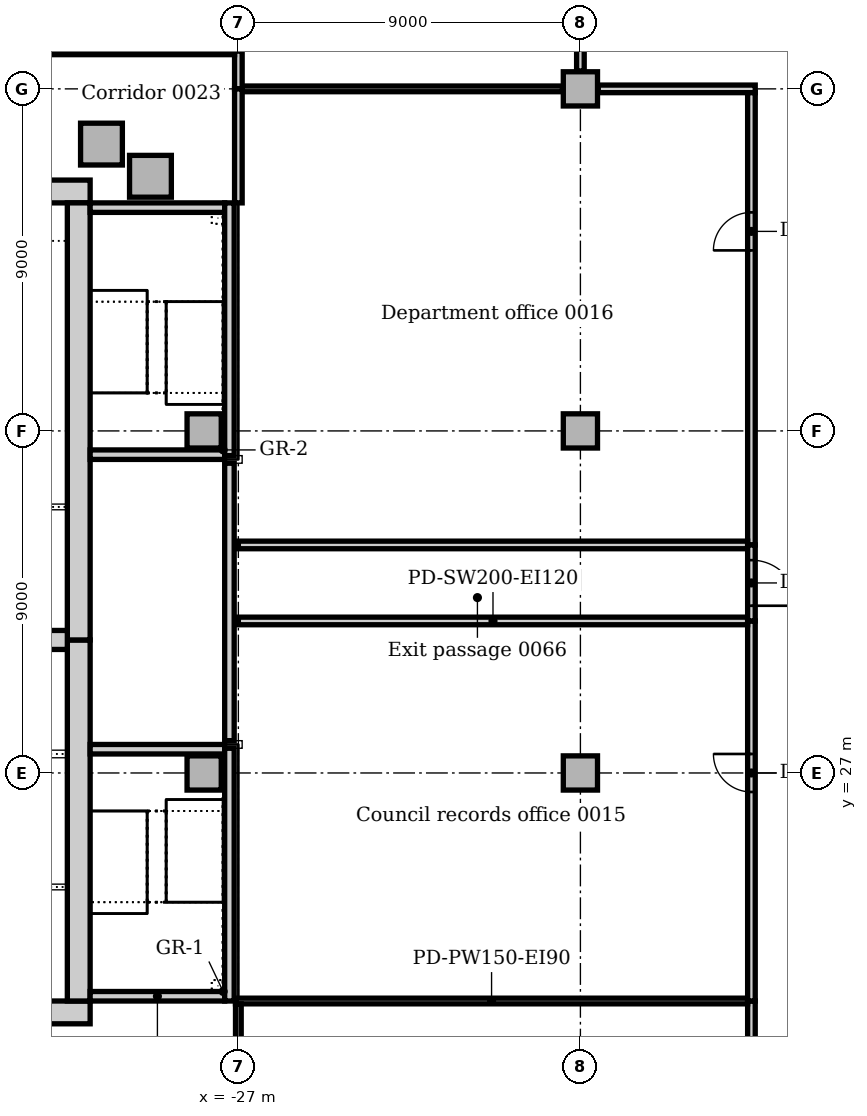
"""IFC4 building model, lengths in metres.
Left out: names, types, materials, properties, quantities, classifications, styles, units other than length and angle.
Written with IfcOpenShell. Run it as: python <this file> out.ifc"""

import sys

from ifc_helpers import new_model, si_unit, direction, frame, frame_2d, origin, origin_2d, place, context, subcontext, project, spatial, rectangle, extrude, element, fill, save


model = new_model("IFC4")
c1 = context("Model", 3, precision=1e-05, world=origin(), true_north=direction((0.0, 1.0)))
c2 = subcontext(c1, "Body", "Model", "MODEL_VIEW")
j1 = project(units=[si_unit("LENGTHUNIT", "METRE"), si_unit("PLANEANGLEUNIT", "RADIAN")], contexts=[c1])
p1 = place(None, origin())
s1 = spatial("IfcSite", under=j1, at=p1, CompositionType="ELEMENT")
p2 = place(p1, origin())
s2 = spatial("IfcBuilding", under=s1, at=p2, CompositionType="ELEMENT")
p3 = place(p2, origin())
s3 = spatial("IfcBuildingStorey", under=s2, at=p3, CompositionType="ELEMENT", Elevation=0.0)
for number, where, z_axis, x_axis in (
    (1, (-42.6, 20.7, 0.0), (0.0, 0.0, 1.0), (1.0, 0.0, 0.0)),
    (2, (-30.9, 42.3, 0.0), (0.0, 0.0, 1.0), (-1.0, 0.0, 0.0)),
):
    element("IfcWall", number, at=place(p3, frame(where, z_axis=z_axis, x_axis=x_axis)), inside=s3, PredefinedType="SOLIDWALL", context=c2, shape_type="SweptSolid", body=[
        extrude(rectangle(XDim=11.7, YDim=0.6, at=frame_2d((5.85, 0.0))), origin(), (0.0, 0.0, 1.0), 6.0),
    ])
p4 = place(p3, frame((-31.2, 21.0, 0.0), z_axis=(0.0, 0.0, 1.0), x_axis=(0.0, 1.0, 0.0)))
e3 = element("IfcWall", 3, at=p4, inside=s3, PredefinedType="SOLIDWALL", context=c2, shape_type="SweptSolid", body=[
    extrude(rectangle(XDim=9.5, YDim=0.6, at=frame_2d((4.75, 0.0))), origin(), (0.0, 0.0, 1.0), 6.0),
])
p5 = place(p4, frame((5.25, 0.0, 0.0)))
e4 = element("IfcOpeningElement", 4, at=p5, cuts=e3, PredefinedType="OPENING", context=c2, shape_type="SweptSolid", body=[
    extrude(rectangle(XDim=1.0, YDim=2.1, at=frame_2d((0.5, 1.05))), frame((0.0, 0.31, 0.0), z_axis=(0.0, -1.0, 0.0), x_axis=(1.0, 0.0, 0.0)), (0.0, 0.0, 1.0), 0.62),
])
p6 = place(p3, frame((-31.2, 30.5, 0.0), z_axis=(0.0, 0.0, 1.0), x_axis=(0.0, 1.0, 0.0)))
e5 = element("IfcWall", 5, at=p6, inside=s3, PredefinedType="SOLIDWALL", context=c2, shape_type="SweptSolid", body=[
    extrude(rectangle(XDim=11.5, YDim=0.6, at=frame_2d((5.75, 0.0))), origin(), (0.0, 0.0, 1.0), 6.0),
])
p7 = place(p6, frame((0.85, 0.0, 0.0)))
e6 = element("IfcOpeningElement", 6, at=p7, cuts=e5, PredefinedType="OPENING", context=c2, shape_type="SweptSolid", body=[
    extrude(rectangle(XDim=1.8, YDim=2.1, at=frame_2d((0.9, 1.05))), frame((0.0, 0.31, 0.0), z_axis=(0.0, -1.0, 0.0), x_axis=(1.0, 0.0, 0.0)), (0.0, 0.0, 1.0), 0.62),
])
p8 = place(p3, frame((-42.0, 30.5, 0.0), z_axis=(0.0, 0.0, 1.0), x_axis=(1.0, 0.0, 0.0)))
e7 = element("IfcWall", 7, at=p8, inside=s3, PredefinedType="SOLIDWALL", context=c2, shape_type="SweptSolid", body=[
    extrude(rectangle(XDim=10.5, YDim=0.5, at=frame_2d((5.25, 0.0))), origin(), (0.0, 0.0, 1.0), 6.0),
])
p9 = place(p3, frame((-30.9, 21.125, 0.0), z_axis=(0.0, 0.0, 1.0), x_axis=(1.0, 0.0, 0.0)))
e8 = element("IfcWall", 8, at=p9, inside=s3, PredefinedType="SOLIDWALL", context=c2, shape_type="SweptSolid", body=[
    extrude(rectangle(XDim=3.54, YDim=0.25, at=frame_2d((1.77, 0.0))), origin(), (0.0, 0.0, 1.0), 6.0),
])
p10 = place(p3, frame((-27.36, 27.625, 0.0), z_axis=(0.0, 0.0, 1.0), x_axis=(-1.0, 0.0, 0.0)))
e9 = element("IfcWall", 9, at=p10, inside=s3, PredefinedType="SOLIDWALL", context=c2, shape_type="SweptSolid", body=[
    extrude(rectangle(XDim=3.54, YDim=0.25, at=frame_2d((1.77, 0.0))), origin(), (0.0, 0.0, 1.0), 6.0),
])
p11 = place(p10, frame((1.69, 0.0, 0.0)))
e10 = element("IfcOpeningElement", 10, at=p11, cuts=e9, PredefinedType="OPENING", context=c2, shape_type="SweptSolid", body=[
    extrude(rectangle(XDim=1.1, YDim=2.1, at=frame_2d((0.55, 1.05))), frame((0.0, 0.135, 0.0), z_axis=(0.0, -1.0, 0.0), x_axis=(1.0, 0.0, 0.0)), (0.0, 0.0, 1.0), 0.27),
])
p12 = place(p3, frame((-30.9, 35.375, 0.0), z_axis=(0.0, 0.0, 1.0), x_axis=(1.0, 0.0, 0.0)))
e11 = element("IfcWall", 11, at=p12, inside=s3, PredefinedType="SOLIDWALL", context=c2, shape_type="SweptSolid", body=[
    extrude(rectangle(XDim=3.54, YDim=0.25, at=frame_2d((1.77, 0.0))), origin(), (0.0, 0.0, 1.0), 6.0),
])
p13 = place(p12, frame((0.75, 0.0, 0.0)))
e12 = element("IfcOpeningElement", 12, at=p13, cuts=e11, PredefinedType="OPENING", context=c2, shape_type="SweptSolid", body=[
    extrude(rectangle(XDim=1.1, YDim=2.1, at=frame_2d((0.55, 1.05))), frame((0.0, 0.135, 0.0), z_axis=(0.0, -1.0, 0.0), x_axis=(1.0, 0.0, 0.0)), (0.0, 0.0, 1.0), 0.27),
])
p14 = place(p3, frame((-27.36, 41.875, 0.0), z_axis=(0.0, 0.0, 1.0), x_axis=(-1.0, 0.0, 0.0)))
e13 = element("IfcWall", 13, at=p14, inside=s3, PredefinedType="SOLIDWALL", context=c2, shape_type="SweptSolid", body=[
    extrude(rectangle(XDim=3.54, YDim=0.25, at=frame_2d((1.77, 0.0))), origin(), (0.0, 0.0, 1.0), 6.0),
])
p15 = place(p3, frame((-27.235, 21.0, 0.0), z_axis=(0.0, 0.0, 1.0), x_axis=(0.0, 1.0, 0.0)))
e14 = element("IfcWall", 14, at=p15, inside=s3, PredefinedType="SOLIDWALL", context=c2, shape_type="SweptSolid", body=[
    extrude(rectangle(XDim=6.65, YDim=0.25, at=frame_2d((3.325, 0.0))), origin(), (0.0, 0.0, 1.0), 6.0),
])
p16 = place(p3, frame((-27.235, 27.85, 0.0), z_axis=(0.0, 0.0, 1.0), x_axis=(0.0, 1.0, 0.0)))
e15 = element("IfcWall", 15, at=p16, inside=s3, PredefinedType="SOLIDWALL", context=c2, shape_type="SweptSolid", body=[
    extrude(rectangle(XDim=7.3, YDim=0.25, at=frame_2d((3.65, 0.0))), origin(), (0.0, 0.0, 1.0), 6.0),
])
p17 = place(p16, frame((3.6, 0.0, 0.0)))
e16 = element("IfcOpeningElement", 16, at=p17, cuts=e15, PredefinedType="OPENING", context=c2, shape_type="SweptSolid", body=[
    extrude(rectangle(XDim=1.1, YDim=2.1, at=frame_2d((0.55, 1.05))), frame((0.0, 0.135, 0.0), z_axis=(0.0, -1.0, 0.0), x_axis=(1.0, 0.0, 0.0)), (0.0, 0.0, 1.0), 0.27),
])
p18 = place(p3, frame((-27.235, 35.35, 0.0), z_axis=(0.0, 0.0, 1.0), x_axis=(0.0, 1.0, 0.0)))
e17 = element("IfcWall", 17, at=p18, inside=s3, PredefinedType="SOLIDWALL", context=c2, shape_type="SweptSolid", body=[
    extrude(rectangle(XDim=6.65, YDim=0.25, at=frame_2d((3.325, 0.0))), origin(), (0.0, 0.0, 1.0), 6.0),
])
for number, where, z_axis, x_axis in (
    (18, (-29.313, 42.7, 0.0), (0.0, 0.0, 1.0), (1.0, 0.0, 0.0)),
    (19, (-30.602, 43.547, 0.0), (0.0, 0.0, 1.0), (1.0, 0.0, 0.0)),
):
    element("IfcColumn", number, at=place(p3, frame(where, z_axis=z_axis, x_axis=x_axis)), inside=s3, PredefinedType="COLUMN", context=c2, shape_type="SweptSolid", body=[
        extrude(rectangle(XDim=1.1, YDim=1.1, at=origin_2d()), origin(), (0.0, 0.0, 1.0), 5.7),
    ])
for number, where, z_axis, x_axis in (
    (20, (-27.9, 27.0, 0.0), (0.0, 0.0, 1.0), (1.0, 0.0, 0.0)),
    (21, (-27.9, 36.0, 0.0), (0.0, 0.0, 1.0), (1.0, 0.0, 0.0)),
):
    element("IfcColumn", number, at=place(p3, frame(where, z_axis=z_axis, x_axis=x_axis)), inside=s3, PredefinedType="COLUMN", context=c2, shape_type="SweptSolid", body=[
        extrude(rectangle(XDim=0.9, YDim=0.9, at=origin_2d()), origin(), (0.0, 0.0, 1.0), 6.0),
    ])
for number, where, z_axis, x_axis in (
    (22, (-18.0, 27.0, 0.0), (0.0, 0.0, 1.0), (1.0, 0.0, 0.0)),
    (23, (-18.0, 36.0, 0.0), (0.0, 0.0, 1.0), (1.0, 0.0, 0.0)),
    (24, (-18.0, 45.0, 0.0), (0.0, 0.0, 1.0), (1.0, 0.0, 0.0)),
):
    element("IfcColumn", number, at=place(p3, frame(where, z_axis=z_axis, x_axis=x_axis)), inside=s3, PredefinedType="COLUMN", context=c2, shape_type="SweptSolid", body=[
        extrude(rectangle(XDim=0.9, YDim=0.9, at=origin_2d()), origin(), (0.0, 0.0, 1.0), 5.7),
    ])
p19 = place(p3, frame((-13.5, 12.1, 0.0), z_axis=(0.0, 0.0, 1.0), x_axis=(0.0, 1.0, 0.0)))
e25 = element("IfcWall", 25, at=p19, inside=s3, PredefinedType="PARTITIONING", context=c2, shape_type="SweptSolid", body=[
    extrude(rectangle(XDim=8.9, YDim=0.2, at=frame_2d((4.45, 0.0))), origin(), (0.0, 0.0, 1.0), 5.7),
])
p20 = place(p3, frame((-27.075, 21.0, 0.0), z_axis=(0.0, 0.0, 1.0), x_axis=(1.0, 0.0, 0.0)))
e26 = element("IfcWall", 26, at=p20, inside=s3, PredefinedType="PARTITIONING", context=c2, shape_type="SweptSolid", body=[
    extrude(rectangle(XDim=13.475, YDim=0.15, at=frame_2d((6.737, 0.0))), origin(), (0.0, 0.0, 1.0), 5.7),
])
p21 = place(p3, frame((-27.0, 12.0, 0.0), z_axis=(0.0, 0.0, 1.0), x_axis=(0.0, 1.0, 0.0)))
e27 = element("IfcWall", 27, at=p21, inside=s3, PredefinedType="PARTITIONING", context=c2, shape_type="SweptSolid", body=[
    extrude(rectangle(XDim=8.925, YDim=0.15, at=frame_2d((4.463, 0.0))), origin(), (0.0, 0.0, 1.0), 5.7),
])
p22 = place(p3, frame((-26.9, 45.0, 0.0), z_axis=(0.0, 0.0, 1.0), x_axis=(1.0, 0.0, 0.0)))
e28 = element("IfcWall", 28, at=p22, inside=s3, PredefinedType="PARTITIONING", context=c2, shape_type="SweptSolid", body=[
    extrude(rectangle(XDim=8.43, YDim=0.15, at=frame_2d((4.215, 0.0))), origin(), (0.0, 0.0, 1.0), 5.7),
])
p23 = place(p3, frame((-18.0, 45.47, 0.0), z_axis=(0.0, 0.0, 1.0), x_axis=(0.0, 1.0, 0.0)))
e29 = element("IfcWall", 29, at=p23, inside=s3, PredefinedType="PARTITIONING", context=c2, shape_type="SweptSolid", body=[
    extrude(rectangle(XDim=8.06, YDim=0.2, at=frame_2d((4.03, 0.0))), origin(), (0.0, 0.0, 1.0), 5.7),
])
p24 = place(p23, frame((5.03, 0.0, 0.0)))
e30 = element("IfcOpeningElement", 30, at=p24, cuts=e29, PredefinedType="OPENING", context=c2, shape_type="SweptSolid", body=[
    extrude(rectangle(XDim=1.0, YDim=2.1, at=frame_2d((0.5, 1.05))), frame((0.0, 0.11, 0.0), z_axis=(0.0, -1.0, 0.0), x_axis=(1.0, 0.0, 0.0)), (0.0, 0.0, 1.0), 0.22),
])
p25 = place(p3, frame((-27.0, 45.0, 0.0), z_axis=(0.0, 0.0, 1.0), x_axis=(0.0, 1.0, 0.0)))
e31 = element("IfcWall", 31, at=p25, inside=s3, PredefinedType="PARTITIONING", context=c2, shape_type="SweptSolid", body=[
    extrude(rectangle(XDim=1.0, YDim=0.2, at=frame_2d((0.5, 0.0))), origin(), (0.0, 0.0, 1.0), 5.7),
])
p26 = place(p3, frame((-13.5, 21.0, 0.0), z_axis=(0.0, 0.0, 1.0), x_axis=(0.0, 1.0, 0.0)))
e32 = element("IfcWall", 32, at=p26, inside=s3, PredefinedType="PARTITIONING", context=c2, shape_type="SweptSolid", body=[
    extrude(rectangle(XDim=10.0, YDim=0.2, at=frame_2d((5.0, 0.0))), origin(), (0.0, 0.0, 1.0), 5.7),
])
p27 = place(p26, frame((5.5, 0.0, 0.0)))
e33 = element("IfcOpeningElement", 33, at=p27, cuts=e32, PredefinedType="OPENING", context=c2, shape_type="SweptSolid", body=[
    extrude(rectangle(XDim=1.0, YDim=2.1, at=frame_2d((0.5, 1.05))), frame((0.0, 0.11, 0.0), z_axis=(0.0, -1.0, 0.0), x_axis=(1.0, 0.0, 0.0)), (0.0, 0.0, 1.0), 0.22),
])
p28 = place(p3, frame((-27.0, 31.0, 0.0), z_axis=(0.0, 0.0, 1.0), x_axis=(1.0, 0.0, 0.0)))
e34 = element("IfcWall", 34, at=p28, inside=s3, PredefinedType="SOLIDWALL", context=c2, shape_type="SweptSolid", body=[
    extrude(rectangle(XDim=13.4, YDim=0.2, at=frame_2d((6.7, 0.0))), origin(), (0.0, 0.0, 1.0), 5.7),
])
p29 = place(p3, frame((-17.53, 45.0, 0.0), z_axis=(0.0, 0.0, 1.0), x_axis=(1.0, 0.0, 0.0)))
e35 = element("IfcWall", 35, at=p29, inside=s3, PredefinedType="PARTITIONING", context=c2, shape_type="SweptSolid", body=[
    extrude(rectangle(XDim=4.13, YDim=0.2, at=frame_2d((2.065, 0.0))), origin(), (0.0, 0.0, 1.0), 5.7),
])
p30 = place(p3, frame((-13.5, 33.0, 0.0), z_axis=(0.0, 0.0, 1.0), x_axis=(0.0, 1.0, 0.0)))
e36 = element("IfcWall", 36, at=p30, inside=s3, PredefinedType="PARTITIONING", context=c2, shape_type="SweptSolid", body=[
    extrude(rectangle(XDim=11.9, YDim=0.2, at=frame_2d((5.95, 0.0))), origin(), (0.0, 0.0, 1.0), 5.7),
])
p31 = place(p30, frame((7.75, 0.0, 0.0)))
e37 = element("IfcOpeningElement", 37, at=p31, cuts=e36, PredefinedType="OPENING", context=c2, shape_type="SweptSolid", body=[
    extrude(rectangle(XDim=1.0, YDim=2.1, at=frame_2d((0.5, 1.05))), frame((0.0, 0.11, 0.0), z_axis=(0.0, -1.0, 0.0), x_axis=(1.0, 0.0, 0.0)), (0.0, 0.0, 1.0), 0.22),
])
p32 = place(p3, frame((-27.0, 42.0, 0.0), z_axis=(0.0, 0.0, 1.0), x_axis=(0.0, 1.0, 0.0)))
e38 = element("IfcWall", 38, at=p32, inside=s3, PredefinedType="PARTITIONING", context=c2, shape_type="SweptSolid", body=[
    extrude(rectangle(XDim=3.0, YDim=0.2, at=frame_2d((1.5, 0.0))), origin(), (0.0, 0.0, 1.0), 5.7),
])
p33 = place(p3, frame((-27.0, 33.0, 0.0), z_axis=(0.0, 0.0, 1.0), x_axis=(1.0, 0.0, 0.0)))
e39 = element("IfcWall", 39, at=p33, inside=s3, PredefinedType="SOLIDWALL", context=c2, shape_type="SweptSolid", body=[
    extrude(rectangle(XDim=13.4, YDim=0.2, at=frame_2d((6.7, 0.0))), origin(), (0.0, 0.0, 1.0), 5.7),
])
p34 = place(p3, frame((-13.5, 31.0, 0.0), z_axis=(0.0, 0.0, 1.0), x_axis=(0.0, 1.0, 0.0)))
e40 = element("IfcWall", 40, at=p34, inside=s3, PredefinedType="SOLIDWALL", context=c2, shape_type="SweptSolid", body=[
    extrude(rectangle(XDim=2.0, YDim=0.2, at=frame_2d((1.0, 0.0))), origin(), (0.0, 0.0, 1.0), 5.7),
])
p35 = place(p34, frame((0.4, 0.0, 0.0)))
e41 = element("IfcOpeningElement", 41, at=p35, cuts=e40, PredefinedType="OPENING", context=c2, shape_type="SweptSolid", body=[
    extrude(rectangle(XDim=1.2, YDim=2.1, at=frame_2d((0.6, 1.05))), frame((0.0, 0.11, 0.0), z_axis=(0.0, -1.0, 0.0), x_axis=(1.0, 0.0, 0.0)), (0.0, 0.0, 1.0), 0.22),
])
p36 = place(p3, frame((-36.0, 46.0, 0.0), z_axis=(0.0, 0.0, 1.0), x_axis=(1.0, 0.0, 0.0)))
e42 = element("IfcWall", 42, at=p36, inside=s3, PredefinedType="PARTITIONING", context=c2, shape_type="SweptSolid", body=[
    extrude(rectangle(XDim=8.9, YDim=0.2, at=frame_2d((4.45, 0.0))), origin(), (0.0, 0.0, 1.0), 5.7),
])
p37 = place(p36, frame((4.0, 0.0, 0.0)))
e43 = element("IfcOpeningElement", 43, at=p37, cuts=e42, PredefinedType="OPENING", context=c2, shape_type="SweptSolid", body=[
    extrude(rectangle(XDim=1.0, YDim=2.1, at=frame_2d((0.5, 1.05))), frame((0.0, 0.11, 0.0), z_axis=(0.0, -1.0, 0.0), x_axis=(1.0, 0.0, 0.0)), (0.0, 0.0, 1.0), 0.22),
])
p38 = place(p3, frame((-34.9, 27.5, 0.0), z_axis=(0.0, 0.0, 1.0), x_axis=(1.0, 0.0, 0.0)))
e44 = element("IfcWall", 44, at=p38, inside=s3, PredefinedType="SOLIDWALL", context=c2, shape_type="SweptSolid", body=[
    extrude(rectangle(XDim=3.4, YDim=0.2, at=frame_2d((1.7, 0.0))), origin(), (0.0, 0.0, 1.0), 6.0),
])
p39 = place(p38, frame((1.1, 0.0, 0.0)))
e45 = element("IfcOpeningElement", 45, at=p39, cuts=e44, PredefinedType="OPENING", context=c2, shape_type="SweptSolid", body=[
    extrude(rectangle(XDim=1.1, YDim=2.1, at=frame_2d((0.55, 1.05))), frame((0.0, 0.11, 0.0), z_axis=(0.0, -1.0, 0.0), x_axis=(1.0, 0.0, 0.0)), (0.0, 0.0, 1.0), 0.22),
])
for number, where, z_axis, x_axis in (
    (46, (-27.36, 27.75, 0.0), (0.0, 0.0, 1.0), (1.0, 0.0, 0.0)),
    (47, (-26.9, 35.25, 0.0), (0.0, 0.0, 1.0), (-1.0, 0.0, 0.0)),
):
    element("IfcWall", number, at=place(p3, frame(where, z_axis=z_axis, x_axis=x_axis)), inside=s3, PredefinedType="SOLIDWALL", context=c2, shape_type="SweptSolid", body=[
        extrude(rectangle(XDim=0.46, YDim=0.2, at=frame_2d((0.23, 0.0))), origin(), (0.0, 0.0, 1.0), 6.0),
    ])
p40 = place(p3, frame((-31.5, 24.0, 0.0), z_axis=(0.0, 0.0, 1.0), x_axis=(-1.0, 0.0, 0.0)))
e48 = element("IfcWall", 48, at=p40, inside=s3, PredefinedType="SOLIDWALL", context=c2, shape_type="SweptSolid", body=[
    extrude(rectangle(XDim=3.4, YDim=0.15, at=frame_2d((1.7, 0.0))), origin(), (0.0, 0.0, 1.0), 6.0),
])
p41 = place(p3, frame((-34.075, 34.0, 0.0), z_axis=(0.0, 0.0, 1.0), x_axis=(1.0, 0.0, 0.0)))
e49 = element("IfcWall", 49, at=p41, inside=s3, PredefinedType="SOLIDWALL", context=c2, shape_type="SweptSolid", body=[
    extrude(rectangle(XDim=2.575, YDim=0.15, at=frame_2d((1.288, 0.0))), origin(), (0.0, 0.0, 1.0), 6.0),
])
p42 = place(p27, origin())
e50 = element("IfcDoor", 50, at=p42, inside=s3, OperationType="SINGLE_SWING_RIGHT", PredefinedType="DOOR", context=c2, shape_type="SweptSolid", body=[
    extrude(rectangle(XDim=1.0, YDim=2.1, at=frame_2d((0.5, 1.05))), frame((0.0, 0.025, 0.0), z_axis=(0.0, -1.0, 0.0), x_axis=(1.0, 0.0, 0.0)), (0.0, 0.0, 1.0), 0.05),
])
fill(e33, e50)
p43 = place(p31, origin())
e51 = element("IfcDoor", 51, at=p43, inside=s3, OperationType="SINGLE_SWING_LEFT", PredefinedType="DOOR", context=c2, shape_type="SweptSolid", body=[
    extrude(rectangle(XDim=1.0, YDim=2.1, at=frame_2d((0.5, 1.05))), frame((0.0, 0.025, 0.0), z_axis=(0.0, -1.0, 0.0), x_axis=(1.0, 0.0, 0.0)), (0.0, 0.0, 1.0), 0.05),
])
fill(e37, e51)
p44 = place(p35, frame((1.2, 0.0, 0.0), z_axis=(0.0, 0.0, 1.0), x_axis=(-1.0, 0.0, 0.0)))
e52 = element("IfcDoor", 52, at=p44, inside=s3, OperationType="SINGLE_SWING_RIGHT", PredefinedType="DOOR", context=c2, shape_type="SweptSolid", body=[
    extrude(rectangle(XDim=1.2, YDim=2.1, at=frame_2d((0.6, 1.05))), frame((0.0, 0.025, 0.0), z_axis=(0.0, -1.0, 0.0), x_axis=(1.0, 0.0, 0.0)), (0.0, 0.0, 1.0), 0.05),
])
fill(e41, e52)
p45 = place(p5, frame((1.0, 0.0, 0.0), z_axis=(0.0, 0.0, 1.0), x_axis=(-1.0, 0.0, 0.0)))
e53 = element("IfcDoor", 53, at=p45, inside=s3, OperationType="SINGLE_SWING_LEFT", PredefinedType="DOOR", context=c2, shape_type="SweptSolid", body=[
    extrude(rectangle(XDim=1.0, YDim=2.1, at=frame_2d((0.5, 1.05))), frame((0.0, 0.025, 0.0), z_axis=(0.0, -1.0, 0.0), x_axis=(1.0, 0.0, 0.0)), (0.0, 0.0, 1.0), 0.05),
])
fill(e4, e53)
p46 = place(p11, origin())
e54 = element("IfcDoor", 54, at=p46, inside=s3, OperationType="SINGLE_SWING_RIGHT", PredefinedType="DOOR", context=c2, shape_type="SweptSolid", body=[
    extrude(rectangle(XDim=1.1, YDim=2.1, at=frame_2d((0.55, 1.05))), frame((0.0, 0.025, 0.0), z_axis=(0.0, -1.0, 0.0), x_axis=(1.0, 0.0, 0.0)), (0.0, 0.0, 1.0), 0.05),
])
fill(e10, e54)
p47 = place(p13, origin())
e55 = element("IfcDoor", 55, at=p47, inside=s3, OperationType="SINGLE_SWING_LEFT", PredefinedType="DOOR", context=c2, shape_type="SweptSolid", body=[
    extrude(rectangle(XDim=1.1, YDim=2.1, at=frame_2d((0.55, 1.05))), frame((0.0, 0.025, 0.0), z_axis=(0.0, -1.0, 0.0), x_axis=(1.0, 0.0, 0.0)), (0.0, 0.0, 1.0), 0.05),
])
fill(e12, e55)
p48 = place(p7, origin())
e56 = element("IfcDoor", 56, at=p48, inside=s3, OperationType="DOUBLE_DOOR_SINGLE_SWING", PredefinedType="DOOR", context=c2, shape_type="SweptSolid", body=[
    extrude(rectangle(XDim=1.8, YDim=2.1, at=frame_2d((0.9, 1.05))), frame((0.0, 0.025, 0.0), z_axis=(0.0, -1.0, 0.0), x_axis=(1.0, 0.0, 0.0)), (0.0, 0.0, 1.0), 0.05),
])
fill(e6, e56)
p49 = place(p17, origin())
e57 = element("IfcDoor", 57, at=p49, inside=s3, OperationType="SINGLE_SWING_LEFT", PredefinedType="DOOR", context=c2, shape_type="SweptSolid", body=[
    extrude(rectangle(XDim=1.1, YDim=2.1, at=frame_2d((0.55, 1.05))), frame((0.0, 0.025, 0.0), z_axis=(0.0, -1.0, 0.0), x_axis=(1.0, 0.0, 0.0)), (0.0, 0.0, 1.0), 0.05),
])
fill(e16, e57)
save(model, sys.argv[1])
